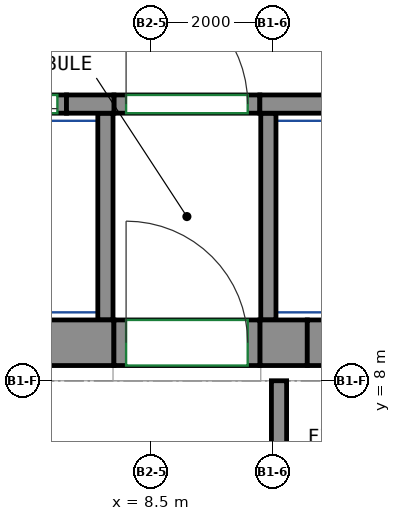
"""IFC4 building model, lengths in metres.
Left out: names, types, materials, properties, quantities, classifications, styles, units other than length and angle.
Written with IfcOpenShell. Run it as: python <this file> out.ifc"""

import sys

from ifc_helpers import new_model, si_unit, direction, frame, frame_2d, origin, place, context, subcontext, project, spatial, rectangle, extrude, source, transform, mapped, element, fill, save


model = new_model("IFC4")
c1 = context("Model", 3, precision=1e-05, world=origin(), true_north=direction((0.0, 1.0)))
c2 = subcontext(c1, "Body", "Model", "MODEL_VIEW")
j1 = project(units=[si_unit("LENGTHUNIT", "METRE"), si_unit("PLANEANGLEUNIT", "RADIAN")], contexts=[c1])
p1 = place(None, origin())
s1 = spatial("IfcSite", under=j1, at=p1, CompositionType="ELEMENT")
p2 = place(p1, origin())
s2 = spatial("IfcBuilding", under=s1, at=p2, CompositionType="ELEMENT")
p3 = place(p2, frame((0.0, 0.0, 249.2)))
s3 = spatial("IfcBuildingStorey", under=s2, at=p3, CompositionType="ELEMENT", Elevation=249.2)
m1 = source(origin(), c2, "Body", "SweptSolid", [
    extrude(rectangle(XDim=14.18, YDim=0.75, at=frame_2d((7.09, 0.0))), origin(), (0.0, 0.0, 1.0), 3.12),
])
p4 = place(p3, frame((-6.29, 8.625, 0.0), z_axis=(0.0, 0.0, 1.0), x_axis=(1.0, 0.0, 0.0)))
e1 = element("IfcWall", 1, at=p4, inside=s3, PredefinedType="SHEAR", context=c2, shape_type="MappedRepresentation", body=[
    mapped(m1, transform((0.0, 0.0, 0.0))),
])
m2 = source(origin(), c2, "Body", "SweptSolid", [
    extrude(rectangle(XDim=0.78, YDim=0.75, at=frame_2d((0.39, 0.0))), origin(), (0.0, 0.0, 1.0), 3.12),
])
p5 = place(p3, frame((10.29, 8.625, 0.0), z_axis=(0.0, 0.0, 1.0), x_axis=(1.0, 0.0, 0.0)))
e2 = element("IfcWall", 2, at=p5, inside=s3, PredefinedType="SHEAR", context=c2, shape_type="MappedRepresentation", body=[
    mapped(m2, transform((0.0, 0.0, 0.0))),
])
m3 = source(origin(), c2, "Body", "SweptSolid", [
    extrude(rectangle(XDim=0.78, YDim=0.3, at=frame_2d((0.39, 0.0))), origin(), (0.0, 0.0, 1.0), 3.12),
])
p6 = place(p3, frame((7.11, 12.55, 0.0), z_axis=(0.0, 0.0, 1.0), x_axis=(1.0, 0.0, 0.0)))
e3 = element("IfcWall", 3, at=p6, inside=s3, PredefinedType="SHEAR", context=c2, shape_type="MappedRepresentation", body=[
    mapped(m3, transform((0.0, 0.0, 0.0))),
])
m4 = source(origin(), c2, "Body", "SweptSolid", [
    extrude(rectangle(XDim=2.82, YDim=0.3, at=frame_2d((1.41, 0.0))), origin(), (0.0, 0.0, 1.0), 3.12),
])
p7 = place(p3, frame((10.29, 12.55, 0.0), z_axis=(0.0, 0.0, 1.0), x_axis=(1.0, 0.0, 0.0)))
e4 = element("IfcWall", 4, at=p7, inside=s3, PredefinedType="SHEAR", context=c2, shape_type="MappedRepresentation", body=[
    mapped(m4, transform((0.0, 0.0, 0.0))),
])
m5 = source(origin(), c2, "Body", "SweptSolid", [
    extrude(rectangle(XDim=1.4, YDim=0.3, at=frame_2d((0.7, 0.0))), origin(), (0.0, 0.0, 1.0), 3.12),
])
p8 = place(p3, frame((5.71, 12.55, 0.0), z_axis=(0.0, 0.0, 1.0), x_axis=(1.0, 0.0, 0.0)))
e5 = element("IfcWall", 5, at=p8, inside=s3, PredefinedType="PARTITIONING", context=c2, shape_type="MappedRepresentation", body=[
    mapped(m5, transform((0.0, 0.0, 0.0))),
])
p9 = place(p8, frame((0.15, 0.0, 0.0)))
e6 = element("IfcOpeningElement", 6, at=p9, cuts=e5, PredefinedType="OPENING", context=c2, shape_type="SweptSolid", body=[
    extrude(rectangle(XDim=1.1, YDim=2.1, at=frame_2d((0.55, 1.05))), frame((0.0, 0.16, 0.0), z_axis=(0.0, -1.0, 0.0), x_axis=(1.0, 0.0, 0.0)), (0.0, 0.0, 1.0), 0.32),
])
m6 = source(origin(), c2, "Body", "SweptSolid", [
    extrude(rectangle(XDim=2.4, YDim=0.3, at=frame_2d((1.2, 0.0))), origin(), (0.0, 0.0, 1.0), 3.12),
])
p10 = place(p3, frame((7.89, 12.55, 0.0), z_axis=(0.0, 0.0, 1.0), x_axis=(1.0, 0.0, 0.0)))
e7 = element("IfcWall", 7, at=p10, inside=s3, PredefinedType="PARTITIONING", context=c2, shape_type="MappedRepresentation", body=[
    mapped(m6, transform((0.0, 0.0, 0.0))),
])
p11 = place(p10, frame((0.2, 0.0, 0.0)))
e8 = element("IfcOpeningElement", 8, at=p11, cuts=e7, PredefinedType="OPENING", context=c2, shape_type="SweptSolid", body=[
    extrude(rectangle(XDim=2.0, YDim=2.1, at=frame_2d((1.0, 1.05))), frame((0.0, 0.16, 0.0), z_axis=(0.0, -1.0, 0.0), x_axis=(1.0, 0.0, 0.0)), (0.0, 0.0, 1.0), 0.32),
])
m7 = source(origin(), c2, "Body", "SweptSolid", [
    extrude(rectangle(XDim=2.65, YDim=0.25, at=frame_2d((1.325, 0.0))), origin(), (0.0, 0.0, 1.0), 2.57),
])
p12 = place(p3, frame((10.605, 5.35, 0.0), z_axis=(0.0, 0.0, 1.0), x_axis=(0.0, 1.0, 0.0)))
e9 = element("IfcWall", 9, at=p12, inside=s3, PredefinedType="PARTITIONING", context=c2, shape_type="MappedRepresentation", body=[
    mapped(m7, transform((0.0, 0.0, 0.0))),
])
m8 = source(origin(), c2, "Body", "SweptSolid", [
    extrude(rectangle(XDim=3.4, YDim=0.25, at=frame_2d((1.7, 0.0))), origin(), (0.0, 0.0, 1.0), 3.12),
])
for number, where, z_axis, x_axis in (
    (10, (10.43, 9.0, 0.0), (0.0, 0.0, 1.0), (0.0, 1.0, 0.0)),
    (11, (7.75, 9.0, 0.0), (0.0, 0.0, 1.0), (0.0, 1.0, 0.0)),
):
    element("IfcWall", number, at=place(p3, frame(where, z_axis=z_axis, x_axis=x_axis)), inside=s3, PredefinedType="PARTITIONING", context=c2, shape_type="MappedRepresentation", body=[
        mapped(m8, transform((0.0, 0.0, 0.0))),
    ])
m9 = source(origin(), c2, "Body", "SweptSolid", [
    extrude(rectangle(XDim=2.4, YDim=0.75, at=frame_2d((1.2, 0.0))), origin(), (0.0, 0.0, 1.0), 2.7),
])
p13 = place(p3, frame((7.89, 8.625, 0.0), z_axis=(0.0, 0.0, 1.0), x_axis=(1.0, 0.0, 0.0)))
e12 = element("IfcWall", 12, at=p13, inside=s3, PredefinedType="PARTITIONING", context=c2, shape_type="MappedRepresentation", body=[
    mapped(m9, transform((0.0, 0.0, 0.0))),
])
p14 = place(p13, frame((0.2, 0.0, 0.0)))
e13 = element("IfcOpeningElement", 13, at=p14, cuts=e12, PredefinedType="OPENING", context=c2, shape_type="SweptSolid", body=[
    extrude(rectangle(XDim=2.0, YDim=2.1, at=frame_2d((1.0, 1.05))), frame((0.0, 0.385, 0.0), z_axis=(0.0, -1.0, 0.0), x_axis=(1.0, 0.0, 0.0)), (0.0, 0.0, 1.0), 0.77),
])
m10 = source(origin(), c2, "Body", "SweptSolid", [
    extrude(rectangle(XDim=1.4, YDim=0.75, at=frame_2d((0.7, 0.0))), origin(), (0.0, 0.0, 1.0), 2.7),
])
p15 = place(p3, frame((11.07, 8.625, 0.0), z_axis=(0.0, 0.0, 1.0), x_axis=(1.0, 0.0, 0.0)))
e14 = element("IfcWall", 14, at=p15, inside=s3, PredefinedType="PARTITIONING", context=c2, shape_type="MappedRepresentation", body=[
    mapped(m10, transform((0.0, 0.0, 0.0))),
])
p16 = place(p15, frame((0.25, 0.0, 0.0)))
e15 = element("IfcOpeningElement", 15, at=p16, cuts=e14, PredefinedType="OPENING", context=c2, shape_type="SweptSolid", body=[
    extrude(rectangle(XDim=0.9, YDim=2.1, at=frame_2d((0.45, 1.05))), frame((0.0, 0.385, 0.0), z_axis=(0.0, -1.0, 0.0), x_axis=(1.0, 0.0, 0.0)), (0.0, 0.0, 1.0), 0.77),
])
p17 = place(p11, origin())
e16 = element("IfcDoor", 16, at=p17, inside=s3, OperationType="DOUBLE_DOOR_SINGLE_SWING", PredefinedType="DOOR", context=c2, shape_type="SweptSolid", body=[
    extrude(rectangle(XDim=2.0, YDim=2.1, at=frame_2d((1.0, 1.05))), frame((0.0, 0.025, 0.0), z_axis=(0.0, -1.0, 0.0), x_axis=(1.0, 0.0, 0.0)), (0.0, 0.0, 1.0), 0.05),
])
fill(e8, e16)
p18 = place(p14, origin())
e17 = element("IfcDoor", 17, at=p18, inside=s3, OperationType="DOUBLE_DOOR_SINGLE_SWING", PredefinedType="DOOR", context=c2, shape_type="SweptSolid", body=[
    extrude(rectangle(XDim=2.0, YDim=2.1, at=frame_2d((1.0, 1.05))), frame((0.0, 0.28, 0.0), z_axis=(0.0, -1.0, 0.0), x_axis=(1.0, 0.0, 0.0)), (0.0, 0.0, 1.0), 0.05),
])
fill(e13, e17)
p19 = place(p9, origin())
e18 = element("IfcDoor", 18, at=p19, inside=s3, OperationType="DOUBLE_DOOR_SLIDING", PredefinedType="DOOR", context=c2, shape_type="SweptSolid", body=[
    extrude(rectangle(XDim=1.1, YDim=2.1, at=frame_2d((0.55, 1.05))), frame((0.0, 0.025, 0.0), z_axis=(0.0, -1.0, 0.0), x_axis=(1.0, 0.0, 0.0)), (0.0, 0.0, 1.0), 0.05),
])
fill(e6, e18)
save(model, sys.argv[1])
